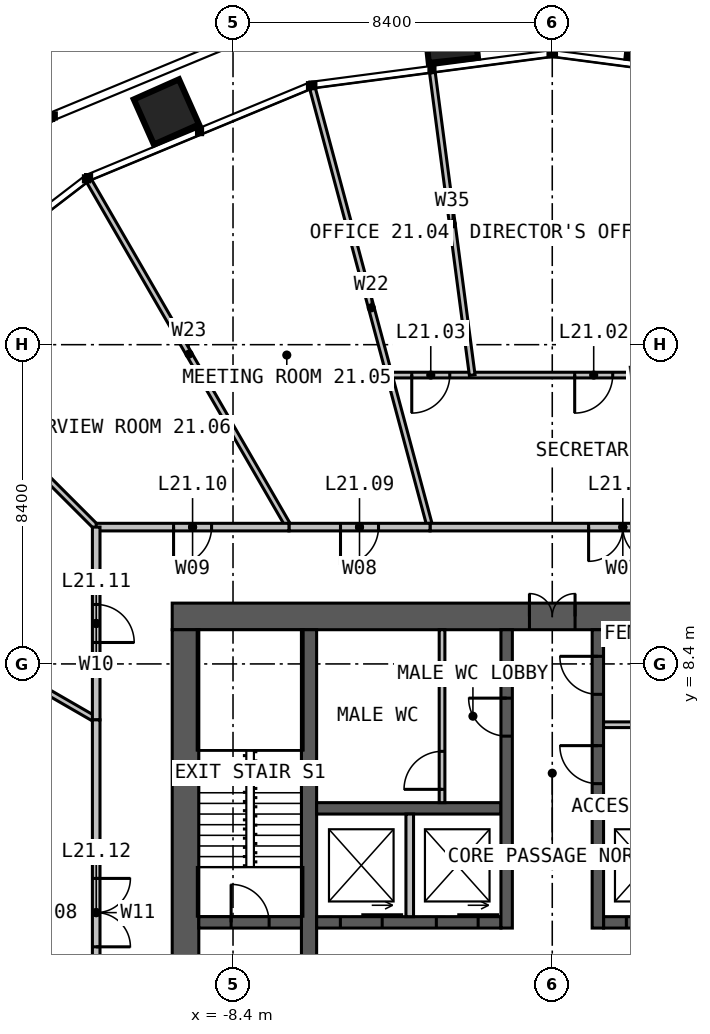
"""IFC4 building model, lengths in metres.
Left out: names, types, materials, properties, quantities, classifications, styles, units other than length and angle.
Written with IfcOpenShell. Run it as: python <this file> out.ifc"""

import sys

from ifc_helpers import new_model, si_unit, direction, frame, frame_2d, origin, place, context, subcontext, project, spatial, rectangle, extrude, element, fill, save


model = new_model("IFC4")
c1 = context("Model", 3, precision=1e-05, world=origin(), true_north=direction((0.0, 1.0)))
c2 = subcontext(c1, "Body", "Model", "MODEL_VIEW")
j1 = project(units=[si_unit("LENGTHUNIT", "METRE"), si_unit("PLANEANGLEUNIT", "RADIAN")], contexts=[c1])
p1 = place(None, origin())
s1 = spatial("IfcSite", under=j1, at=p1, CompositionType="ELEMENT")
p2 = place(p1, origin())
s2 = spatial("IfcBuilding", under=s1, at=p2, CompositionType="ELEMENT")
p3 = place(p2, frame((0.0, 0.0, 90.0)))
s3 = spatial("IfcBuildingStorey", under=s2, at=p3, CompositionType="ELEMENT", Elevation=90.0)
p4 = place(p3, frame((-10.0, 9.65, 0.0), z_axis=(0.0, 0.0, 1.0), x_axis=(1.0, 0.0, 0.0)))
e1 = element("IfcWall", 1, at=p4, inside=s3, PredefinedType="SOLIDWALL", context=c2, shape_type="SweptSolid", body=[
    extrude(rectangle(XDim=20.0, YDim=0.7, at=frame_2d((10.0, 0.0))), origin(), (0.0, 0.0, 1.0), 4.0),
])
p5 = place(p4, frame((9.4, 0.0, 0.0)))
e2 = element("IfcOpeningElement", 2, at=p5, cuts=e1, PredefinedType="OPENING", context=c2, shape_type="SweptSolid", body=[
    extrude(rectangle(XDim=1.2, YDim=2.2, at=frame_2d((0.6, 1.1))), frame((0.0, 0.36, 0.0), z_axis=(0.0, -1.0, 0.0), x_axis=(1.0, 0.0, 0.0)), (0.0, 0.0, 1.0), 0.72),
])
p6 = place(p3, frame((-9.65, 9.3, 0.0), z_axis=(0.0, 0.0, 1.0), x_axis=(0.0, -1.0, 0.0)))
e3 = element("IfcWall", 3, at=p6, inside=s3, PredefinedType="SOLIDWALL", context=c2, shape_type="SweptSolid", body=[
    extrude(rectangle(XDim=18.6, YDim=0.7, at=frame_2d((9.3, 0.0))), origin(), (0.0, 0.0, 1.0), 4.0),
])
p7 = place(p3, frame((-6.4, -9.3, 0.0), z_axis=(0.0, 0.0, 1.0), x_axis=(0.0, 1.0, 0.0)))
e4 = element("IfcWall", 4, at=p7, inside=s3, PredefinedType="SOLIDWALL", context=c2, shape_type="SweptSolid", body=[
    extrude(rectangle(XDim=18.6, YDim=0.4, at=frame_2d((9.3, 0.0))), origin(), (0.0, 0.0, 1.0), 4.0),
])
p8 = place(p7, frame((8.8, 0.0, 0.0)))
e5 = element("IfcOpeningElement", 5, at=p8, cuts=e4, PredefinedType="OPENING", context=c2, shape_type="SweptSolid", body=[
    extrude(rectangle(XDim=1.0, YDim=2.2, at=frame_2d((0.5, 1.1))), frame((0.0, 0.21, 0.0), z_axis=(0.0, -1.0, 0.0), x_axis=(1.0, 0.0, 0.0)), (0.0, 0.0, 1.0), 0.42),
])
p9 = place(p3, frame((-6.2, 1.6, 0.0), z_axis=(0.0, 0.0, 1.0), x_axis=(1.0, 0.0, 0.0)))
e6 = element("IfcWall", 6, at=p9, inside=s3, PredefinedType="SOLIDWALL", context=c2, shape_type="SweptSolid", body=[
    extrude(rectangle(XDim=4.85, YDim=0.3, at=frame_2d((2.425, 0.0))), origin(), (0.0, 0.0, 1.0), 4.0),
])
p10 = place(p9, frame((0.625, 0.0, 0.0)))
e7 = element("IfcOpeningElement", 7, at=p10, cuts=e6, PredefinedType="OPENING", context=c2, shape_type="SweptSolid", body=[
    extrude(rectangle(XDim=1.1, YDim=2.2, at=frame_2d((0.55, 1.1))), frame((0.0, 0.16, 0.0), z_axis=(0.0, -1.0, 0.0), x_axis=(1.0, 0.0, 0.0)), (0.0, 0.0, 1.0), 0.32),
])
p11 = place(p9, frame((3.15, 0.0, 0.0)))
e8 = element("IfcOpeningElement", 8, at=p11, cuts=e6, PredefinedType="OPENING", context=c2, shape_type="SweptSolid", body=[
    extrude(rectangle(XDim=1.1, YDim=2.2, at=frame_2d((0.55, 1.1))), frame((0.0, 0.16, 0.0), z_axis=(0.0, -1.0, 0.0), x_axis=(1.0, 0.0, 0.0)), (0.0, 0.0, 1.0), 0.32),
])
p12 = place(p3, frame((1.35, 1.6, 0.0), z_axis=(0.0, 0.0, 1.0), x_axis=(1.0, 0.0, 0.0)))
e9 = element("IfcWall", 9, at=p12, inside=s3, PredefinedType="SOLIDWALL", context=c2, shape_type="SweptSolid", body=[
    extrude(rectangle(XDim=4.85, YDim=0.3, at=frame_2d((2.425, 0.0))), origin(), (0.0, 0.0, 1.0), 4.0),
])
p13 = place(p12, frame((0.6, 0.0, 0.0)))
e10 = element("IfcOpeningElement", 10, at=p13, cuts=e9, PredefinedType="OPENING", context=c2, shape_type="SweptSolid", body=[
    extrude(rectangle(XDim=1.1, YDim=2.2, at=frame_2d((0.55, 1.1))), frame((0.0, 0.16, 0.0), z_axis=(0.0, -1.0, 0.0), x_axis=(1.0, 0.0, 0.0)), (0.0, 0.0, 1.0), 0.32),
])
p14 = place(p12, frame((3.125, 0.0, 0.0)))
e11 = element("IfcOpeningElement", 11, at=p14, cuts=e9, PredefinedType="OPENING", context=c2, shape_type="SweptSolid", body=[
    extrude(rectangle(XDim=1.1, YDim=2.2, at=frame_2d((0.55, 1.1))), frame((0.0, 0.16, 0.0), z_axis=(0.0, -1.0, 0.0), x_axis=(1.0, 0.0, 0.0)), (0.0, 0.0, 1.0), 0.32),
])
for number, where, z_axis, x_axis in (
    (12, (-6.2, 4.6, 0.0), (0.0, 0.0, 1.0), (1.0, 0.0, 0.0)),
    (13, (1.35, 4.6, 0.0), (0.0, 0.0, 1.0), (1.0, 0.0, 0.0)),
):
    element("IfcWall", number, at=place(p3, frame(where, z_axis=z_axis, x_axis=x_axis)), inside=s3, PredefinedType="SOLIDWALL", context=c2, shape_type="SweptSolid", body=[
        extrude(rectangle(XDim=4.85, YDim=0.3, at=frame_2d((2.425, 0.0))), origin(), (0.0, 0.0, 1.0), 4.0),
    ])
p15 = place(p3, frame((-1.2, 1.45, 0.0), z_axis=(0.0, 0.0, 1.0), x_axis=(0.0, 1.0, 0.0)))
e14 = element("IfcWall", 14, at=p15, inside=s3, PredefinedType="SOLIDWALL", context=c2, shape_type="SweptSolid", body=[
    extrude(rectangle(XDim=7.85, YDim=0.3, at=frame_2d((3.925, 0.0))), origin(), (0.0, 0.0, 1.0), 4.0),
])
p16 = place(p15, frame((5.05, 0.0, 0.0)))
e15 = element("IfcOpeningElement", 15, at=p16, cuts=e14, PredefinedType="OPENING", context=c2, shape_type="SweptSolid", body=[
    extrude(rectangle(XDim=1.0, YDim=2.2, at=frame_2d((0.5, 1.1))), frame((0.0, 0.16, 0.0), z_axis=(0.0, -1.0, 0.0), x_axis=(1.0, 0.0, 0.0)), (0.0, 0.0, 1.0), 0.32),
])
p17 = place(p3, frame((1.2, 1.45, 0.0), z_axis=(0.0, 0.0, 1.0), x_axis=(0.0, 1.0, 0.0)))
e16 = element("IfcWall", 16, at=p17, inside=s3, PredefinedType="SOLIDWALL", context=c2, shape_type="SweptSolid", body=[
    extrude(rectangle(XDim=7.85, YDim=0.3, at=frame_2d((3.925, 0.0))), origin(), (0.0, 0.0, 1.0), 4.0),
])
p18 = place(p17, frame((3.8, 0.0, 0.0)))
e17 = element("IfcOpeningElement", 17, at=p18, cuts=e16, PredefinedType="OPENING", context=c2, shape_type="SweptSolid", body=[
    extrude(rectangle(XDim=1.0, YDim=2.2, at=frame_2d((0.5, 1.1))), frame((0.0, 0.16, 0.0), z_axis=(0.0, -1.0, 0.0), x_axis=(1.0, 0.0, 0.0)), (0.0, 0.0, 1.0), 0.32),
])
p19 = place(p17, frame((6.15, 0.0, 0.0)))
e18 = element("IfcOpeningElement", 18, at=p19, cuts=e16, PredefinedType="OPENING", context=c2, shape_type="SweptSolid", body=[
    extrude(rectangle(XDim=1.0, YDim=2.2, at=frame_2d((0.5, 1.1))), frame((0.0, 0.16, 0.0), z_axis=(0.0, -1.0, 0.0), x_axis=(1.0, 0.0, 0.0)), (0.0, 0.0, 1.0), 0.32),
])
p20 = place(p3, frame((-9.3, 1.6, 0.0), z_axis=(0.0, 0.0, 1.0), x_axis=(1.0, 0.0, 0.0)))
e19 = element("IfcWall", 19, at=p20, inside=s3, PredefinedType="SOLIDWALL", context=c2, shape_type="SweptSolid", body=[
    extrude(rectangle(XDim=2.7, YDim=0.3, at=frame_2d((1.35, 0.0))), origin(), (0.0, 0.0, 1.0), 4.0),
])
p21 = place(p20, frame((0.85, 0.0, 0.0)))
e20 = element("IfcOpeningElement", 20, at=p21, cuts=e19, PredefinedType="OPENING", context=c2, shape_type="SweptSolid", body=[
    extrude(rectangle(XDim=1.0, YDim=2.2, at=frame_2d((0.5, 1.1))), frame((0.0, 0.16, 0.0), z_axis=(0.0, -1.0, 0.0), x_axis=(1.0, 0.0, 0.0)), (0.0, 0.0, 1.0), 0.32),
])
p22 = place(p3, frame((-3.75, 1.75, 0.0), z_axis=(0.0, 0.0, 1.0), x_axis=(0.0, 1.0, 0.0)))
e21 = element("IfcWall", 21, at=p22, inside=s3, PredefinedType="SOLIDWALL", context=c2, shape_type="SweptSolid", body=[
    extrude(rectangle(XDim=2.7, YDim=0.2, at=frame_2d((1.35, 0.0))), origin(), (0.0, 0.0, 1.0), 3.75),
])
p23 = place(p3, frame((1.35, 6.8, 0.0), z_axis=(0.0, 0.0, 1.0), x_axis=(1.0, 0.0, 0.0)))
e22 = element("IfcWall", 22, at=p23, inside=s3, PredefinedType="PARTITIONING", context=c2, shape_type="SweptSolid", body=[
    extrude(rectangle(XDim=4.85, YDim=0.15, at=frame_2d((2.425, 0.0))), origin(), (0.0, 0.0, 1.0), 3.75),
])
p24 = place(p23, frame((3.15, 0.0, 0.0)))
e23 = element("IfcOpeningElement", 23, at=p24, cuts=e22, PredefinedType="OPENING", context=c2, shape_type="SweptSolid", body=[
    extrude(rectangle(XDim=0.9, YDim=2.2, at=frame_2d((0.45, 1.1))), frame((0.0, 0.085, 0.0), z_axis=(0.0, -1.0, 0.0), x_axis=(1.0, 0.0, 0.0)), (0.0, 0.0, 1.0), 0.17),
])
p25 = place(p3, frame((-2.9, 4.75, 0.0), z_axis=(0.0, 0.0, 1.0), x_axis=(0.0, 1.0, 0.0)))
e24 = element("IfcWall", 24, at=p25, inside=s3, PredefinedType="PARTITIONING", context=c2, shape_type="SweptSolid", body=[
    extrude(rectangle(XDim=4.55, YDim=0.15, at=frame_2d((2.275, 0.0))), origin(), (0.0, 0.0, 1.0), 3.75),
])
p26 = place(p25, frame((0.35, 0.0, 0.0)))
e25 = element("IfcOpeningElement", 25, at=p26, cuts=e24, PredefinedType="OPENING", context=c2, shape_type="SweptSolid", body=[
    extrude(rectangle(XDim=1.0, YDim=2.2, at=frame_2d((0.5, 1.1))), frame((0.0, 0.085, 0.0), z_axis=(0.0, -1.0, 0.0), x_axis=(1.0, 0.0, 0.0)), (0.0, 0.0, 1.0), 0.17),
])
p27 = place(p3, frame((-3.215, 12.0, 0.0), z_axis=(0.0, 0.0, 1.0), x_axis=(-0.258816099716, 0.965926615498, 0.0)))
e26 = element("IfcWall", 26, at=p27, inside=s3, PredefinedType="PARTITIONING", context=c2, shape_type="SweptSolid", body=[
    extrude(rectangle(XDim=11.947, YDim=0.15, at=frame_2d((5.973, 0.0))), origin(), (0.0, 0.0, 1.0), 2.89),
])
p28 = place(p3, frame((-6.928, 12.0, 0.0), z_axis=(0.0, 0.0, 1.0), x_axis=(-0.499995153367, 0.866028201971, 0.0)))
e27 = element("IfcWall", 27, at=p28, inside=s3, PredefinedType="PARTITIONING", context=c2, shape_type="SweptSolid", body=[
    extrude(rectangle(XDim=10.514, YDim=0.15, at=frame_2d((5.257, 0.0))), origin(), (0.0, 0.0, 1.0), 2.89),
])
p29 = place(p3, frame((-12.0, 12.0, 0.0), z_axis=(0.0, 0.0, 1.0), x_axis=(-0.707106781187, 0.707106781187, 0.0)))
e28 = element("IfcWall", 28, at=p29, inside=s3, PredefinedType="PARTITIONING", context=c2, shape_type="SweptSolid", body=[
    extrude(rectangle(XDim=7.4, YDim=0.15, at=frame_2d((3.7, 0.0))), origin(), (0.0, 0.0, 1.0), 2.89),
])
p30 = place(p3, frame((-12.0, 6.928, 0.0), z_axis=(0.0, 0.0, 1.0), x_axis=(-0.866028201971, 0.499995153367, 0.0)))
e29 = element("IfcWall", 29, at=p30, inside=s3, PredefinedType="PARTITIONING", context=c2, shape_type="SweptSolid", body=[
    extrude(rectangle(XDim=10.514, YDim=0.15, at=frame_2d((5.257, 0.0))), origin(), (0.0, 0.0, 1.0), 2.89),
])
p31 = place(p3, frame((9.238, 16.0, 0.0), z_axis=(0.0, 0.0, 1.0), x_axis=(-1.0, 0.0, 0.0)))
e30 = element("IfcWall", 30, at=p31, inside=s3, PredefinedType="PARTITIONING", context=c2, shape_type="SweptSolid", body=[
    extrude(rectangle(XDim=13.525, YDim=0.15, at=frame_2d((6.762, 0.0))), origin(), (0.0, 0.0, 1.0), 2.89),
])
p32 = place(p31, frame((1.975, 0.0, 0.0)))
e31 = element("IfcOpeningElement", 31, at=p32, cuts=e30, PredefinedType="OPENING", context=c2, shape_type="SweptSolid", body=[
    extrude(rectangle(XDim=1.0, YDim=2.2, at=frame_2d((0.5, 1.1))), frame((0.0, 0.085, 0.0), z_axis=(0.0, -1.0, 0.0), x_axis=(1.0, 0.0, 0.0)), (0.0, 0.0, 1.0), 0.17),
])
p33 = place(p31, frame((7.647, 0.0, 0.0)))
e32 = element("IfcOpeningElement", 32, at=p33, cuts=e30, PredefinedType="OPENING", context=c2, shape_type="SweptSolid", body=[
    extrude(rectangle(XDim=1.0, YDim=2.2, at=frame_2d((0.5, 1.1))), frame((0.0, 0.085, 0.0), z_axis=(0.0, -1.0, 0.0), x_axis=(1.0, 0.0, 0.0)), (0.0, 0.0, 1.0), 0.17),
])
p34 = place(p31, frame((11.934, 0.0, 0.0)))
e33 = element("IfcOpeningElement", 33, at=p34, cuts=e30, PredefinedType="OPENING", context=c2, shape_type="SweptSolid", body=[
    extrude(rectangle(XDim=1.0, YDim=2.2, at=frame_2d((0.5, 1.1))), frame((0.0, 0.085, 0.0), z_axis=(0.0, -1.0, 0.0), x_axis=(1.0, 0.0, 0.0)), (0.0, 0.0, 1.0), 0.17),
])
p35 = place(p3, frame((-2.106, 16.0, 0.0), z_axis=(0.0, 0.0, 1.0), x_axis=(-0.130533221372, 0.991443935943, 0.0)))
e34 = element("IfcWall", 34, at=p35, inside=s3, PredefinedType="PARTITIONING", context=c2, shape_type="SweptSolid", body=[
    extrude(rectangle(XDim=8.024, YDim=0.15, at=frame_2d((4.012, 0.0))), origin(), (0.0, 0.0, 1.0), 2.79),
])
p36 = place(p3, frame((6.928, 12.0, 0.0), z_axis=(0.0, 0.0, 1.0), x_axis=(-1.0, 0.0, 0.0)))
e35 = element("IfcWall", 35, at=p36, inside=s3, PredefinedType="PARTITIONING", context=c2, shape_type="SweptSolid", body=[
    extrude(rectangle(XDim=10.144, YDim=0.2, at=frame_2d((5.072, 0.0))), origin(), (0.0, 0.0, 1.0), 3.8),
])
p37 = place(p36, frame((4.172, 0.0, 0.0)))
e36 = element("IfcOpeningElement", 36, at=p37, cuts=e35, PredefinedType="OPENING", context=c2, shape_type="SweptSolid", body=[
    extrude(rectangle(XDim=1.8, YDim=2.2, at=frame_2d((0.9, 1.1))), frame((0.0, 0.11, 0.0), z_axis=(0.0, -1.0, 0.0), x_axis=(1.0, 0.0, 0.0)), (0.0, 0.0, 1.0), 0.22),
])
p38 = place(p3, frame((-3.215, 12.0, 0.0), z_axis=(0.0, 0.0, 1.0), x_axis=(-1.0, 0.0, 0.0)))
e37 = element("IfcWall", 37, at=p38, inside=s3, PredefinedType="PARTITIONING", context=c2, shape_type="SweptSolid", body=[
    extrude(rectangle(XDim=3.713, YDim=0.2, at=frame_2d((1.856, 0.0))), origin(), (0.0, 0.0, 1.0), 3.8),
])
p39 = place(p38, frame((1.356, 0.0, 0.0)))
e38 = element("IfcOpeningElement", 38, at=p39, cuts=e37, PredefinedType="OPENING", context=c2, shape_type="SweptSolid", body=[
    extrude(rectangle(XDim=1.0, YDim=2.2, at=frame_2d((0.5, 1.1))), frame((0.0, 0.11, 0.0), z_axis=(0.0, -1.0, 0.0), x_axis=(1.0, 0.0, 0.0)), (0.0, 0.0, 1.0), 0.22),
])
p40 = place(p3, frame((-6.928, 12.0, 0.0), z_axis=(0.0, 0.0, 1.0), x_axis=(-1.0, 0.0, 0.0)))
e39 = element("IfcWall", 39, at=p40, inside=s3, PredefinedType="PARTITIONING", context=c2, shape_type="SweptSolid", body=[
    extrude(rectangle(XDim=5.072, YDim=0.2, at=frame_2d((2.536, 0.0))), origin(), (0.0, 0.0, 1.0), 3.8),
])
p41 = place(p40, frame((2.036, 0.0, 0.0)))
e40 = element("IfcOpeningElement", 40, at=p41, cuts=e39, PredefinedType="OPENING", context=c2, shape_type="SweptSolid", body=[
    extrude(rectangle(XDim=1.0, YDim=2.2, at=frame_2d((0.5, 1.1))), frame((0.0, 0.11, 0.0), z_axis=(0.0, -1.0, 0.0), x_axis=(1.0, 0.0, 0.0)), (0.0, 0.0, 1.0), 0.22),
])
p42 = place(p3, frame((-12.0, 12.0, 0.0), z_axis=(0.0, 0.0, 1.0), x_axis=(0.0, -1.0, 0.0)))
e41 = element("IfcWall", 41, at=p42, inside=s3, PredefinedType="PARTITIONING", context=c2, shape_type="SweptSolid", body=[
    extrude(rectangle(XDim=5.072, YDim=0.2, at=frame_2d((2.536, 0.0))), origin(), (0.0, 0.0, 1.0), 3.8),
])
p43 = place(p42, frame((2.036, 0.0, 0.0)))
e42 = element("IfcOpeningElement", 42, at=p43, cuts=e41, PredefinedType="OPENING", context=c2, shape_type="SweptSolid", body=[
    extrude(rectangle(XDim=1.0, YDim=2.2, at=frame_2d((0.5, 1.1))), frame((0.0, 0.11, 0.0), z_axis=(0.0, -1.0, 0.0), x_axis=(1.0, 0.0, 0.0)), (0.0, 0.0, 1.0), 0.22),
])
p44 = place(p3, frame((-12.0, 6.928, 0.0), z_axis=(0.0, 0.0, 1.0), x_axis=(0.0, -1.0, 0.0)))
e43 = element("IfcWall", 43, at=p44, inside=s3, PredefinedType="PARTITIONING", context=c2, shape_type="SweptSolid", body=[
    extrude(rectangle(XDim=10.144, YDim=0.2, at=frame_2d((5.072, 0.0))), origin(), (0.0, 0.0, 1.0), 3.8),
])
p45 = place(p44, frame((4.172, 0.0, 0.0)))
e44 = element("IfcOpeningElement", 44, at=p45, cuts=e43, PredefinedType="OPENING", context=c2, shape_type="SweptSolid", body=[
    extrude(rectangle(XDim=1.8, YDim=2.2, at=frame_2d((0.9, 1.1))), frame((0.0, 0.11, 0.0), z_axis=(0.0, -1.0, 0.0), x_axis=(1.0, 0.0, 0.0)), (0.0, 0.0, 1.0), 0.22),
])
p46 = place(p5, origin())
e45 = element("IfcDoor", 45, at=p46, inside=s3, OperationType="DOUBLE_DOOR_SINGLE_SWING", PredefinedType="DOOR", context=c2, shape_type="SweptSolid", body=[
    extrude(rectangle(XDim=1.2, YDim=2.2, at=frame_2d((0.6, 1.1))), frame((0.0, 0.025, 0.0), z_axis=(0.0, -1.0, 0.0), x_axis=(1.0, 0.0, 0.0)), (0.0, 0.0, 1.0), 0.05),
])
fill(e2, e45)
p47 = place(p21, origin())
e46 = element("IfcDoor", 46, at=p47, inside=s3, OperationType="SINGLE_SWING_LEFT", PredefinedType="DOOR", context=c2, shape_type="SweptSolid", body=[
    extrude(rectangle(XDim=1.0, YDim=2.2, at=frame_2d((0.5, 1.1))), frame((0.0, 0.025, 0.0), z_axis=(0.0, -1.0, 0.0), x_axis=(1.0, 0.0, 0.0)), (0.0, 0.0, 1.0), 0.05),
])
fill(e20, e46)
p48 = place(p16, origin())
e47 = element("IfcDoor", 47, at=p48, inside=s3, OperationType="SINGLE_SWING_RIGHT", PredefinedType="DOOR", context=c2, shape_type="SweptSolid", body=[
    extrude(rectangle(XDim=1.0, YDim=2.2, at=frame_2d((0.5, 1.1))), frame((0.0, 0.025, 0.0), z_axis=(0.0, -1.0, 0.0), x_axis=(1.0, 0.0, 0.0)), (0.0, 0.0, 1.0), 0.05),
])
fill(e15, e47)
p49 = place(p18, origin())
e48 = element("IfcDoor", 48, at=p49, inside=s3, OperationType="SINGLE_SWING_RIGHT", PredefinedType="DOOR", context=c2, shape_type="SweptSolid", body=[
    extrude(rectangle(XDim=1.0, YDim=2.2, at=frame_2d((0.5, 1.1))), frame((0.0, 0.025, 0.0), z_axis=(0.0, -1.0, 0.0), x_axis=(1.0, 0.0, 0.0)), (0.0, 0.0, 1.0), 0.05),
])
fill(e17, e48)
p50 = place(p19, origin())
e49 = element("IfcDoor", 49, at=p50, inside=s3, OperationType="SINGLE_SWING_RIGHT", PredefinedType="DOOR", context=c2, shape_type="SweptSolid", body=[
    extrude(rectangle(XDim=1.0, YDim=2.2, at=frame_2d((0.5, 1.1))), frame((0.0, 0.025, 0.0), z_axis=(0.0, -1.0, 0.0), x_axis=(1.0, 0.0, 0.0)), (0.0, 0.0, 1.0), 0.05),
])
fill(e18, e49)
p51 = place(p26, origin())
e50 = element("IfcDoor", 50, at=p51, inside=s3, OperationType="SINGLE_SWING_LEFT", PredefinedType="DOOR", context=c2, shape_type="SweptSolid", body=[
    extrude(rectangle(XDim=1.0, YDim=2.2, at=frame_2d((0.5, 1.1))), frame((0.0, 0.025, 0.0), z_axis=(0.0, -1.0, 0.0), x_axis=(1.0, 0.0, 0.0)), (0.0, 0.0, 1.0), 0.05),
])
fill(e25, e50)
p52 = place(p10, origin())
e51 = element("IfcDoor", 51, at=p52, inside=s3, OperationType="SLIDING_TO_LEFT", PredefinedType="DOOR", context=c2, shape_type="SweptSolid", body=[
    extrude(rectangle(XDim=1.1, YDim=2.2, at=frame_2d((0.55, 1.1))), frame((0.0, 0.025, 0.0), z_axis=(0.0, -1.0, 0.0), x_axis=(1.0, 0.0, 0.0)), (0.0, 0.0, 1.0), 0.05),
])
fill(e7, e51)
p53 = place(p11, origin())
e52 = element("IfcDoor", 52, at=p53, inside=s3, OperationType="SLIDING_TO_LEFT", PredefinedType="DOOR", context=c2, shape_type="SweptSolid", body=[
    extrude(rectangle(XDim=1.1, YDim=2.2, at=frame_2d((0.55, 1.1))), frame((0.0, 0.025, 0.0), z_axis=(0.0, -1.0, 0.0), x_axis=(1.0, 0.0, 0.0)), (0.0, 0.0, 1.0), 0.05),
])
fill(e8, e52)
p54 = place(p13, origin())
e53 = element("IfcDoor", 53, at=p54, inside=s3, OperationType="SLIDING_TO_LEFT", PredefinedType="DOOR", context=c2, shape_type="SweptSolid", body=[
    extrude(rectangle(XDim=1.1, YDim=2.2, at=frame_2d((0.55, 1.1))), frame((0.0, 0.025, 0.0), z_axis=(0.0, -1.0, 0.0), x_axis=(1.0, 0.0, 0.0)), (0.0, 0.0, 1.0), 0.05),
])
fill(e10, e53)
p55 = place(p33, origin())
e54 = element("IfcDoor", 54, at=p55, inside=s3, OperationType="SINGLE_SWING_RIGHT", PredefinedType="DOOR", context=c2, shape_type="SweptSolid", body=[
    extrude(rectangle(XDim=1.0, YDim=2.2, at=frame_2d((0.5, 1.1))), frame((0.0, 0.025, 0.0), z_axis=(0.0, -1.0, 0.0), x_axis=(1.0, 0.0, 0.0)), (0.0, 0.0, 1.0), 0.05),
])
fill(e32, e54)
p56 = place(p34, origin())
e55 = element("IfcDoor", 55, at=p56, inside=s3, OperationType="SINGLE_SWING_RIGHT", PredefinedType="DOOR", context=c2, shape_type="SweptSolid", body=[
    extrude(rectangle(XDim=1.0, YDim=2.2, at=frame_2d((0.5, 1.1))), frame((0.0, 0.025, 0.0), z_axis=(0.0, -1.0, 0.0), x_axis=(1.0, 0.0, 0.0)), (0.0, 0.0, 1.0), 0.05),
])
fill(e33, e55)
p57 = place(p37, origin())
e56 = element("IfcDoor", 56, at=p57, inside=s3, OperationType="DOUBLE_DOOR_SINGLE_SWING", PredefinedType="DOOR", context=c2, shape_type="SweptSolid", body=[
    extrude(rectangle(XDim=1.8, YDim=2.2, at=frame_2d((0.9, 1.1))), frame((0.0, 0.025, 0.0), z_axis=(0.0, -1.0, 0.0), x_axis=(1.0, 0.0, 0.0)), (0.0, 0.0, 1.0), 0.05),
])
fill(e36, e56)
p58 = place(p39, origin())
e57 = element("IfcDoor", 57, at=p58, inside=s3, OperationType="SINGLE_SWING_RIGHT", PredefinedType="DOOR", context=c2, shape_type="SweptSolid", body=[
    extrude(rectangle(XDim=1.0, YDim=2.2, at=frame_2d((0.5, 1.1))), frame((0.0, 0.025, 0.0), z_axis=(0.0, -1.0, 0.0), x_axis=(1.0, 0.0, 0.0)), (0.0, 0.0, 1.0), 0.05),
])
fill(e38, e57)
p59 = place(p41, origin())
e58 = element("IfcDoor", 58, at=p59, inside=s3, OperationType="SINGLE_SWING_RIGHT", PredefinedType="DOOR", context=c2, shape_type="SweptSolid", body=[
    extrude(rectangle(XDim=1.0, YDim=2.2, at=frame_2d((0.5, 1.1))), frame((0.0, 0.025, 0.0), z_axis=(0.0, -1.0, 0.0), x_axis=(1.0, 0.0, 0.0)), (0.0, 0.0, 1.0), 0.05),
])
fill(e40, e58)
p60 = place(p43, origin())
e59 = element("IfcDoor", 59, at=p60, inside=s3, OperationType="SINGLE_SWING_RIGHT", PredefinedType="DOOR", context=c2, shape_type="SweptSolid", body=[
    extrude(rectangle(XDim=1.0, YDim=2.2, at=frame_2d((0.5, 1.1))), frame((0.0, 0.025, 0.0), z_axis=(0.0, -1.0, 0.0), x_axis=(1.0, 0.0, 0.0)), (0.0, 0.0, 1.0), 0.05),
])
fill(e42, e59)
p61 = place(p45, origin())
e60 = element("IfcDoor", 60, at=p61, inside=s3, OperationType="DOUBLE_DOOR_SINGLE_SWING", PredefinedType="DOOR", context=c2, shape_type="SweptSolid", body=[
    extrude(rectangle(XDim=1.8, YDim=2.2, at=frame_2d((0.9, 1.1))), frame((0.0, 0.025, 0.0), z_axis=(0.0, -1.0, 0.0), x_axis=(1.0, 0.0, 0.0)), (0.0, 0.0, 1.0), 0.05),
])
fill(e44, e60)
save(model, sys.argv[1])
